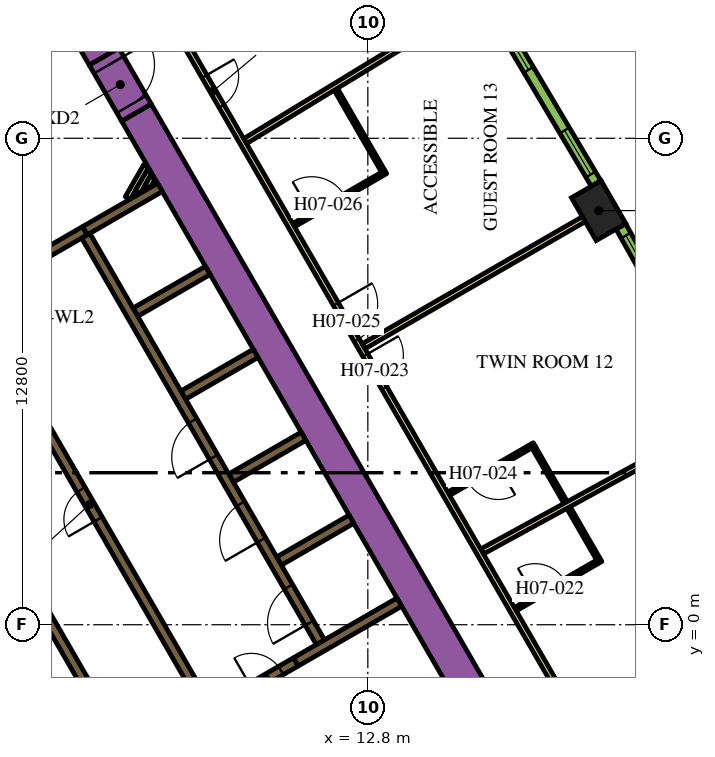
"""IFC4 building model, lengths in metres.
Left out: names, types, materials, properties, quantities, classifications, styles, units other than length and angle.
Written with IfcOpenShell. Run it as: python <this file> out.ifc"""

import sys

from ifc_helpers import new_model, si_unit, direction, frame, frame_2d, origin, origin_2d, place, context, subcontext, project, spatial, polyline, rectangle, outline, extrude, element, fill, save


model = new_model("IFC4")
c1 = context("Model", 3, precision=1e-05, world=origin(), true_north=direction((0.0, 1.0)))
c2 = subcontext(c1, "Body", "Model", "MODEL_VIEW")
j1 = project(units=[si_unit("LENGTHUNIT", "METRE"), si_unit("PLANEANGLEUNIT", "RADIAN")], contexts=[c1])
p1 = place(None, origin())
s1 = spatial("IfcSite", under=j1, at=p1, CompositionType="ELEMENT")
p2 = place(p1, origin())
s2 = spatial("IfcBuilding", under=s1, at=p2, CompositionType="ELEMENT")
p3 = place(p2, frame((0.0, 0.0, 103.2)))
s3 = spatial("IfcBuildingStorey", under=s2, at=p3, CompositionType="ELEMENT", Elevation=103.2)
p4 = place(p3, frame((18.874, 10.897, 0.0), z_axis=(0.0, 0.0, 1.0), x_axis=(-0.5, 0.866025403784, 0.0)))
e1 = element("IfcColumn", 1, at=p4, inside=s3, PredefinedType="COLUMN", context=c2, shape_type="SweptSolid", body=[
    extrude(rectangle(XDim=1.3, YDim=0.9, at=origin_2d()), origin(), (0.0, 0.0, 1.0), 3.9),
])
p5 = place(p3, frame((6.711, 13.476, 0.0), z_axis=(0.0, 0.0, 1.0), x_axis=(0.500002723396, -0.866023831425, 0.0)))
e2 = element("IfcWall", 2, at=p5, inside=s3, PredefinedType="SOLIDWALL", context=c2, shape_type="SweptSolid", body=[
    extrude(rectangle(XDim=20.334, YDim=0.9, at=frame_2d((10.167, 0.0))), origin(), (0.0, 0.0, 1.0), 3.9),
])
p6 = place(p3, frame((5.861, 14.949, 0.0), z_axis=(0.0, 0.0, 1.0), x_axis=(-0.50011719232, 0.865957732194, 0.0)))
e3 = element("IfcWall", 3, at=p6, inside=s3, PredefinedType="SOLIDWALL", context=c2, shape_type="SweptSolid", body=[
    extrude(rectangle(XDim=0.964, YDim=0.9, at=frame_2d((0.482, 0.0))), origin(), (0.0, 0.0, 1.0), 3.9),
])
p7 = place(p3, frame((10.464, 1.677, 0.0), z_axis=(0.0, 0.0, 1.0), x_axis=(0.86605622881, 0.499946605688, 0.0)))
e4 = element("IfcWall", 4, at=p7, inside=s3, PredefinedType="SOLIDWALL", context=c2, shape_type="SweptSolid", body=[
    extrude(rectangle(XDim=2.2, YDim=0.25, at=frame_2d((1.1, 0.0))), origin(), (0.0, 0.0, 1.0), 3.9),
])
p8 = place(p3, frame((13.629, 0.594, 0.0), z_axis=(0.0, 0.0, 1.0), x_axis=(-0.86602790099, -0.499995674689, 0.0)))
e5 = element("IfcWall", 5, at=p8, inside=s3, PredefinedType="SOLIDWALL", context=c2, shape_type="SweptSolid", body=[
    extrude(rectangle(XDim=3.146, YDim=0.25, at=frame_2d((1.573, 0.0))), origin(), (0.0, 0.0, 1.0), 3.9),
])
p9 = place(p3, origin())
e6 = element("IfcWall", 6, at=p9, inside=s3, PredefinedType="SOLIDWALL", context=c2, shape_type="SweptSolid", body=[
    extrude(outline(polyline([(0.566, 6.725), (0.566, 6.875), (0.566, 6.875), (0.565, 6.875), (0.361, 6.875), (0.035, 7.439), (0.252, 7.564), (0.377, 7.348), (6.552, -3.348), (6.677, -3.564), (6.46, -3.689), (0.448, 6.725), (0.565, 6.725), (0.566, 6.725), (0.566, 6.725)])), origin(), (0.0, 0.0, 1.0), 3.9),
])
p10 = place(p3, frame((4.358, 9.791, 0.0), z_axis=(0.0, 0.0, 1.0), x_axis=(0.866079547155, 0.499906209203, 0.0)))
e7 = element("IfcWall", 7, at=p10, inside=s3, PredefinedType="SOLIDWALL", context=c2, shape_type="SweptSolid", body=[
    extrude(rectangle(XDim=1.15, YDim=0.25, at=frame_2d((0.575, 0.0))), origin(), (0.0, 0.0, 1.0), 3.9),
])
p11 = place(p3, frame((5.356, 10.367, 0.0), z_axis=(0.0, 0.0, 1.0), x_axis=(0.865978535641, 0.50008116922, 0.0)))
e8 = element("IfcWall", 8, at=p11, inside=s3, PredefinedType="SOLIDWALL", context=c2, shape_type="SweptSolid", body=[
    extrude(rectangle(XDim=2.278, YDim=0.25, at=frame_2d((1.139, 0.0))), origin(), (0.0, 0.0, 1.0), 3.9),
])
for number, where, z_axis, x_axis in (
    (9, (6.684, 8.224, 0.0), (0.0, 0.0, 1.0), (0.866, 0.5, 0.0)),
    (10, (7.944, 6.041, 0.0), (0.0, 0.0, 1.0), (0.866, 0.5, 0.0)),
    (11, (9.204, 3.859, 0.0), (0.0, 0.0, 1.0), (0.866, 0.5, 0.0)),
):
    element("IfcWall", number, at=place(p3, frame(where, z_axis=z_axis, x_axis=x_axis)), inside=s3, PredefinedType="SOLIDWALL", context=c2, shape_type="SweptSolid", body=[
        extrude(rectangle(XDim=2.2, YDim=0.25, at=frame_2d((1.1, 0.0))), origin(), (0.0, 0.0, 1.0), 3.9),
    ])
p12 = place(p3, frame((6.482, 11.225, 0.0), z_axis=(0.0, 0.0, 1.0), x_axis=(0.5001061818, 0.865964091014, 0.0)))
e12 = element("IfcWall", 12, at=p12, inside=s3, PredefinedType="PARTITIONING", context=c2, shape_type="SweptSolid", body=[
    extrude(rectangle(XDim=0.973, YDim=0.15, at=frame_2d((0.486, 0.0))), origin(), (0.0, 0.0, 1.0), 2.75),
])
p13 = place(p3, frame((6.742, 11.375, 0.0), z_axis=(0.0, 0.0, 1.0), x_axis=(0.499744951064, 0.86617260629, 0.0)))
e13 = element("IfcWall", 13, at=p13, inside=s3, PredefinedType="PARTITIONING", context=c2, shape_type="SweptSolid", body=[
    extrude(rectangle(XDim=0.626, YDim=0.15, at=frame_2d((0.313, 0.0))), origin(), (0.0, 0.0, 1.0), 2.75),
])
p14 = place(p3, frame((7.001, 11.525, 0.0), z_axis=(0.0, 0.0, 1.0), x_axis=(0.499797962495, 0.866142018774, 0.0)))
e14 = element("IfcWall", 14, at=p14, inside=s3, PredefinedType="PARTITIONING", context=c2, shape_type="SweptSolid", body=[
    extrude(rectangle(XDim=0.28, YDim=0.15, at=frame_2d((0.14, 0.0))), origin(), (0.0, 0.0, 1.0), 2.75),
])
p15 = place(p3, frame((11.553, -0.46, 0.0), z_axis=(0.0, 0.0, 1.0), x_axis=(-0.500006514828, 0.866021642414, 0.0)))
e15 = element("IfcWall", 15, at=p15, inside=s3, PredefinedType="SOLIDWALL", context=c2, shape_type="SweptSolid", body=[
    extrude(rectangle(XDim=12.35, YDim=0.25, at=frame_2d((6.175, 0.0))), origin(), (0.0, 0.0, 1.0), 3.9),
])
p16 = place(p15, frame((0.585, 0.0, 0.0)))
e16 = element("IfcOpeningElement", 16, at=p16, cuts=e15, PredefinedType="OPENING", context=c2, shape_type="SweptSolid", body=[
    extrude(rectangle(XDim=1.1, YDim=2.1, at=frame_2d((0.55, 1.05))), frame((0.0, 0.135, 0.0), z_axis=(0.0, -1.0, 0.0), x_axis=(1.0, 0.0, 0.0)), (0.0, 0.0, 1.0), 0.27),
])
p17 = place(p15, frame((3.105, 0.0, 0.0)))
e17 = element("IfcOpeningElement", 17, at=p17, cuts=e15, PredefinedType="OPENING", context=c2, shape_type="SweptSolid", body=[
    extrude(rectangle(XDim=1.1, YDim=2.1, at=frame_2d((0.55, 1.05))), frame((0.0, 0.135, 0.0), z_axis=(0.0, -1.0, 0.0), x_axis=(1.0, 0.0, 0.0)), (0.0, 0.0, 1.0), 0.27),
])
p18 = place(p15, frame((5.625, 0.0, 0.0)))
e18 = element("IfcOpeningElement", 18, at=p18, cuts=e15, PredefinedType="OPENING", context=c2, shape_type="SweptSolid", body=[
    extrude(rectangle(XDim=1.1, YDim=2.1, at=frame_2d((0.55, 1.05))), frame((0.0, 0.135, 0.0), z_axis=(0.0, -1.0, 0.0), x_axis=(1.0, 0.0, 0.0)), (0.0, 0.0, 1.0), 0.27),
])
p19 = place(p3, frame((8.565, -2.185, 0.0), z_axis=(0.0, 0.0, 1.0), x_axis=(-0.499997954832, 0.866026584559, 0.0)))
e19 = element("IfcWall", 19, at=p19, inside=s3, PredefinedType="SOLIDWALL", context=c2, shape_type="SweptSolid", body=[
    extrude(rectangle(XDim=12.35, YDim=0.25, at=frame_2d((6.175, 0.0))), origin(), (0.0, 0.0, 1.0), 3.9),
])
p20 = place(p19, frame((5.725, 0.0, 0.0)))
e20 = element("IfcOpeningElement", 20, at=p20, cuts=e19, PredefinedType="OPENING", context=c2, shape_type="SweptSolid", body=[
    extrude(rectangle(XDim=0.9, YDim=2.1, at=frame_2d((0.45, 1.05))), frame((0.0, 0.135, 0.0), z_axis=(0.0, -1.0, 0.0), x_axis=(1.0, 0.0, 0.0)), (0.0, 0.0, 1.0), 0.27),
])
p21 = place(p3, frame((9.346, -1.879, 0.0), z_axis=(0.0, 0.0, 1.0), x_axis=(0.866047807691, 0.499961193289, 0.0)))
e21 = element("IfcWall", 21, at=p21, inside=s3, PredefinedType="SOLIDWALL", context=c2, shape_type="SweptSolid", body=[
    extrude(rectangle(XDim=1.8, YDim=0.25, at=frame_2d((0.9, 0.0))), origin(), (0.0, 0.0, 1.0), 3.9),
])
p22 = place(p21, frame((0.45, 0.0, 0.0)))
e22 = element("IfcOpeningElement", 22, at=p22, cuts=e21, PredefinedType="OPENING", context=c2, shape_type="SweptSolid", body=[
    extrude(rectangle(XDim=0.9, YDim=2.1, at=frame_2d((0.45, 1.05))), frame((0.0, 0.135, 0.0), z_axis=(0.0, -1.0, 0.0), x_axis=(1.0, 0.0, 0.0)), (0.0, 0.0, 1.0), 0.27),
])
p23 = place(p3, frame((5.861, 14.948, 0.0), z_axis=(0.0, 0.0, 1.0), x_axis=(0.500062241894, -0.865989465428, 0.0)))
e23 = element("IfcWall", 23, at=p23, inside=s3, PredefinedType="SOLIDWALL", context=c2, shape_type="SweptSolid", body=[
    extrude(rectangle(XDim=1.7, YDim=0.9, at=frame_2d((0.85, 0.0))), origin(), (0.0, 0.0, 1.0), 3.9),
])
p24 = place(p23, frame((0.25, 0.0, 0.0)))
e24 = element("IfcOpeningElement", 24, at=p24, cuts=e23, PredefinedType="OPENING", context=c2, shape_type="SweptSolid", body=[
    extrude(rectangle(XDim=1.2, YDim=2.1, at=frame_2d((0.6, 1.05))), frame((0.0, 0.46, 0.0), z_axis=(0.0, -1.0, 0.0), x_axis=(1.0, 0.0, 0.0)), (0.0, 0.0, 1.0), 0.92),
])
p25 = place(p3, frame((6.163, 18.475, 0.0), z_axis=(0.0, 0.0, 1.0), x_axis=(0.500001317485, -0.866024643133, 0.0)))
e25 = element("IfcWall", 25, at=p25, inside=s3, PredefinedType="PARTITIONING", context=c2, shape_type="SweptSolid", body=[
    extrude(rectangle(XDim=25.767, YDim=0.15, at=frame_2d((12.883, 0.0))), origin(), (0.0, 0.0, 1.0), 2.75),
])
p26 = place(p25, frame((24.241, 0.0, 0.0)))
e26 = element("IfcOpeningElement", 26, at=p26, cuts=e25, PredefinedType="OPENING", context=c2, shape_type="SweptSolid", body=[
    extrude(rectangle(XDim=1.0, YDim=2.1, at=frame_2d((0.5, 1.05))), frame((0.0, 0.085, 0.0), z_axis=(0.0, -1.0, 0.0), x_axis=(1.0, 0.0, 0.0)), (0.0, 0.0, 1.0), 0.17),
])
p27 = place(p25, frame((13.144, 0.0, 0.0)))
e27 = element("IfcOpeningElement", 27, at=p27, cuts=e25, PredefinedType="OPENING", context=c2, shape_type="SweptSolid", body=[
    extrude(rectangle(XDim=1.0, YDim=2.1, at=frame_2d((0.5, 1.05))), frame((0.0, 0.085, 0.0), z_axis=(0.0, -1.0, 0.0), x_axis=(1.0, 0.0, 0.0)), (0.0, 0.0, 1.0), 0.17),
])
p28 = place(p25, frame((11.592, 0.0, 0.0)))
e28 = element("IfcOpeningElement", 28, at=p28, cuts=e25, PredefinedType="OPENING", context=c2, shape_type="SweptSolid", body=[
    extrude(rectangle(XDim=1.1, YDim=2.1, at=frame_2d((0.55, 1.05))), frame((0.0, 0.085, 0.0), z_axis=(0.0, -1.0, 0.0), x_axis=(1.0, 0.0, 0.0)), (0.0, 0.0, 1.0), 0.17),
])
p29 = place(p25, frame((4.674, 0.0, 0.0)))
e29 = element("IfcOpeningElement", 29, at=p29, cuts=e25, PredefinedType="OPENING", context=c2, shape_type="SweptSolid", body=[
    extrude(rectangle(XDim=0.9, YDim=2.1, at=frame_2d((0.45, 1.05))), frame((0.0, 0.085, 0.0), z_axis=(0.0, -1.0, 0.0), x_axis=(1.0, 0.0, 0.0)), (0.0, 0.0, 1.0), 0.17),
])
p30 = place(p25, frame((2.411, 0.0, 0.0)))
e30 = element("IfcOpeningElement", 30, at=p30, cuts=e25, PredefinedType="OPENING", context=c2, shape_type="SweptSolid", body=[
    extrude(rectangle(XDim=1.0, YDim=2.1, at=frame_2d((0.5, 1.05))), frame((0.0, 0.085, 0.0), z_axis=(0.0, -1.0, 0.0), x_axis=(1.0, 0.0, 0.0)), (0.0, 0.0, 1.0), 0.17),
])
p31 = place(p3, frame((15.225, 16.167, 0.0), z_axis=(0.0, 0.0, 1.0), x_axis=(-0.854088713274, -0.520127359266, 0.0)))
e31 = element("IfcWall", 31, at=p31, inside=s3, PredefinedType="PARTITIONING", context=c2, shape_type="SweptSolid", body=[
    extrude(rectangle(XDim=6.611, YDim=0.15, at=frame_2d((3.305, 0.0))), origin(), (0.0, 0.0, 1.0), 2.75),
])
p32 = place(p3, frame((18.484, 10.672, 0.0), z_axis=(0.0, 0.0, 1.0), x_axis=(-0.866019162053, -0.50001081084, 0.0)))
e32 = element("IfcWall", 32, at=p32, inside=s3, PredefinedType="PARTITIONING", context=c2, shape_type="SweptSolid", body=[
    extrude(rectangle(XDim=6.694, YDim=0.15, at=frame_2d((3.347, 0.0))), origin(), (0.0, 0.0, 1.0), 2.75),
])
p33 = place(p3, frame((21.614, 5.102, 0.0), z_axis=(0.0, 0.0, 1.0), x_axis=(-0.877484555087, -0.479604895287, 0.0)))
e33 = element("IfcWall", 33, at=p33, inside=s3, PredefinedType="PARTITIONING", context=c2, shape_type="SweptSolid", body=[
    extrude(rectangle(XDim=6.611, YDim=0.15, at=frame_2d((3.306, 0.0))), origin(), (0.0, 0.0, 1.0), 2.75),
])
p34 = place(p3, frame((24.613, -0.541, 0.0), z_axis=(0.0, 0.0, 1.0), x_axis=(-0.888459912519, -0.458954228487, 0.0)))
e34 = element("IfcWall", 34, at=p34, inside=s3, PredefinedType="PARTITIONING", context=c2, shape_type="SweptSolid", body=[
    extrude(rectangle(XDim=6.392, YDim=0.15, at=frame_2d((3.196, 0.0))), origin(), (0.0, 0.0, 1.0), 2.75),
])
p35 = place(p3, frame((16.681, 0.407, 0.0), z_axis=(0.0, 0.0, 1.0), x_axis=(0.866021400173, 0.500006934395, 0.0)))
e35 = element("IfcWall", 35, at=p35, inside=s3, PredefinedType="PARTITIONING", context=c2, shape_type="SweptSolid", body=[
    extrude(rectangle(XDim=2.6, YDim=0.1, at=frame_2d((1.3, 0.0))), origin(), (0.0, 0.0, 1.0), 2.75),
])
p36 = place(p35, frame((0.6, 0.0, 0.0)))
e36 = element("IfcOpeningElement", 36, at=p36, cuts=e35, PredefinedType="OPENING", context=c2, shape_type="SweptSolid", body=[
    extrude(rectangle(XDim=0.9, YDim=2.1, at=frame_2d((0.45, 1.05))), frame((0.0, 0.06, 0.0), z_axis=(0.0, -1.0, 0.0), x_axis=(1.0, 0.0, 0.0)), (0.0, 0.0, 1.0), 0.12),
])
p37 = place(p3, frame((18.86, 1.734, 0.0), z_axis=(0.0, 0.0, 1.0), x_axis=(-0.500017819788, 0.86601511528, 0.0)))
e37 = element("IfcWall", 37, at=p37, inside=s3, PredefinedType="PARTITIONING", context=c2, shape_type="SweptSolid", body=[
    extrude(rectangle(XDim=1.55, YDim=0.1, at=frame_2d((0.775, 0.0))), origin(), (0.0, 0.0, 1.0), 2.75),
])
p38 = place(p3, frame((17.179, 4.745, 0.0), z_axis=(0.0, 0.0, 1.0), x_axis=(-0.866021400173, -0.500006934395, 0.0)))
e38 = element("IfcWall", 38, at=p38, inside=s3, PredefinedType="PARTITIONING", context=c2, shape_type="SweptSolid", body=[
    extrude(rectangle(XDim=2.6, YDim=0.1, at=frame_2d((1.3, 0.0))), origin(), (0.0, 0.0, 1.0), 2.75),
])
p39 = place(p38, frame((1.1, 0.0, 0.0)))
e39 = element("IfcOpeningElement", 39, at=p39, cuts=e38, PredefinedType="OPENING", context=c2, shape_type="SweptSolid", body=[
    extrude(rectangle(XDim=0.9, YDim=2.1, at=frame_2d((0.45, 1.05))), frame((0.0, 0.06, 0.0), z_axis=(0.0, -1.0, 0.0), x_axis=(1.0, 0.0, 0.0)), (0.0, 0.0, 1.0), 0.12),
])
p40 = place(p3, frame((17.161, 4.677, 0.0), z_axis=(0.0, 0.0, 1.0), x_axis=(0.499890179513, -0.866088799389, 0.0)))
e40 = element("IfcWall", 40, at=p40, inside=s3, PredefinedType="PARTITIONING", context=c2, shape_type="SweptSolid", body=[
    extrude(rectangle(XDim=1.68, YDim=0.1, at=frame_2d((0.84, 0.0))), origin(), (0.0, 0.0, 1.0), 2.75),
])
p41 = place(p3, frame((10.847, 10.513, 0.0), z_axis=(0.0, 0.0, 1.0), x_axis=(0.865996816683, 0.500049511043, 0.0)))
e41 = element("IfcWall", 41, at=p41, inside=s3, PredefinedType="PARTITIONING", context=c2, shape_type="SweptSolid", body=[
    extrude(rectangle(XDim=2.8, YDim=0.1, at=frame_2d((1.4, 0.0))), origin(), (0.0, 0.0, 1.0), 2.75),
])
p42 = place(p41, frame((0.55, 0.0, 0.0)))
e42 = element("IfcOpeningElement", 42, at=p42, cuts=e41, PredefinedType="OPENING", context=c2, shape_type="SweptSolid", body=[
    extrude(rectangle(XDim=1.0, YDim=2.1, at=frame_2d((0.5, 1.05))), frame((0.0, 0.06, 0.0), z_axis=(0.0, -1.0, 0.0), x_axis=(1.0, 0.0, 0.0)), (0.0, 0.0, 1.0), 0.12),
])
p43 = place(p3, frame((13.203, 11.931, 0.0), z_axis=(0.0, 0.0, 1.0), x_axis=(-0.499988411372, 0.866032094379, 0.0)))
e43 = element("IfcWall", 43, at=p43, inside=s3, PredefinedType="PARTITIONING", context=c2, shape_type="SweptSolid", body=[
    extrude(rectangle(XDim=2.49, YDim=0.1, at=frame_2d((1.245, 0.0))), origin(), (0.0, 0.0, 1.0), 2.75),
])
p44 = place(p3, frame((21.956, 6.033, 0.0), z_axis=(0.0, 0.0, 1.0), x_axis=(-0.48983164787, 0.87181704316, 0.0)))
e44 = element("IfcWall", 44, at=p44, inside=s3, PredefinedType="SOLIDWALL", context=c2, shape_type="SweptSolid", body=[
    extrude(rectangle(XDim=5.1, YDim=0.29, at=frame_2d((2.55, 0.0))), origin(), (0.0, 0.0, 1.0), 3.65),
])
p45 = place(p44, frame((0.273, 0.0, 0.9)))
e45 = element("IfcOpeningElement", 45, at=p45, cuts=e44, PredefinedType="OPENING", context=c2, shape_type="SweptSolid", body=[
    extrude(rectangle(XDim=1.35, YDim=2.15, at=frame_2d((0.675, 1.075))), frame((0.0, 0.155, 0.0), z_axis=(0.0, -1.0, 0.0), x_axis=(1.0, 0.0, 0.0)), (0.0, 0.0, 1.0), 0.31),
])
p46 = place(p44, frame((3.478, 0.0, 0.9)))
e46 = element("IfcOpeningElement", 46, at=p46, cuts=e44, PredefinedType="OPENING", context=c2, shape_type="SweptSolid", body=[
    extrude(rectangle(XDim=1.35, YDim=2.15, at=frame_2d((0.675, 1.075))), frame((0.0, 0.155, 0.0), z_axis=(0.0, -1.0, 0.0), x_axis=(1.0, 0.0, 0.0)), (0.0, 0.0, 1.0), 0.31),
])
p47 = place(p3, frame((18.805, 11.611, 0.0), z_axis=(0.0, 0.0, 1.0), x_axis=(-0.510054281659, 0.860142214847, 0.0)))
e47 = element("IfcWall", 47, at=p47, inside=s3, PredefinedType="SOLIDWALL", context=c2, shape_type="SweptSolid", body=[
    extrude(rectangle(XDim=5.101, YDim=0.29, at=frame_2d((2.55, 0.0))), origin(), (0.0, 0.0, 1.0), 3.65),
])
p48 = place(p47, frame((0.273, 0.0, 0.9)))
e48 = element("IfcOpeningElement", 48, at=p48, cuts=e47, PredefinedType="OPENING", context=c2, shape_type="SweptSolid", body=[
    extrude(rectangle(XDim=1.35, YDim=2.15, at=frame_2d((0.675, 1.075))), frame((0.0, 0.155, 0.0), z_axis=(0.0, -1.0, 0.0), x_axis=(1.0, 0.0, 0.0)), (0.0, 0.0, 1.0), 0.31),
])
p49 = place(p47, frame((3.478, 0.0, 0.9)))
e49 = element("IfcOpeningElement", 49, at=p49, cuts=e47, PredefinedType="OPENING", context=c2, shape_type="SweptSolid", body=[
    extrude(rectangle(XDim=1.35, YDim=2.15, at=frame_2d((0.675, 1.075))), frame((0.0, 0.155, 0.0), z_axis=(0.0, -1.0, 0.0), x_axis=(1.0, 0.0, 0.0)), (0.0, 0.0, 1.0), 0.31),
])
p50 = place(p16, origin())
e50 = element("IfcDoor", 50, at=p50, inside=s3, OperationType="DOUBLE_DOOR_SLIDING", PredefinedType="DOOR", context=c2, shape_type="SweptSolid", body=[
    extrude(rectangle(XDim=1.1, YDim=2.1, at=frame_2d((0.55, 1.05))), frame((0.0, 0.025, 0.0), z_axis=(0.0, -1.0, 0.0), x_axis=(1.0, 0.0, 0.0)), (0.0, 0.0, 1.0), 0.05),
])
fill(e16, e50)
p51 = place(p17, origin())
e51 = element("IfcDoor", 51, at=p51, inside=s3, OperationType="DOUBLE_DOOR_SLIDING", PredefinedType="DOOR", context=c2, shape_type="SweptSolid", body=[
    extrude(rectangle(XDim=1.1, YDim=2.1, at=frame_2d((0.55, 1.05))), frame((0.0, 0.025, 0.0), z_axis=(0.0, -1.0, 0.0), x_axis=(1.0, 0.0, 0.0)), (0.0, 0.0, 1.0), 0.05),
])
fill(e17, e51)
p52 = place(p18, origin())
e52 = element("IfcDoor", 52, at=p52, inside=s3, OperationType="DOUBLE_DOOR_SLIDING", PredefinedType="DOOR", context=c2, shape_type="SweptSolid", body=[
    extrude(rectangle(XDim=1.1, YDim=2.1, at=frame_2d((0.55, 1.05))), frame((0.0, 0.025, 0.0), z_axis=(0.0, -1.0, 0.0), x_axis=(1.0, 0.0, 0.0)), (0.0, 0.0, 1.0), 0.05),
])
fill(e18, e52)
p53 = place(p20, origin())
e53 = element("IfcDoor", 53, at=p53, inside=s3, OperationType="SINGLE_SWING_LEFT", PredefinedType="DOOR", context=c2, shape_type="SweptSolid", body=[
    extrude(rectangle(XDim=0.9, YDim=2.1, at=frame_2d((0.45, 1.05))), frame((0.0, 0.025, 0.0), z_axis=(0.0, -1.0, 0.0), x_axis=(1.0, 0.0, 0.0)), (0.0, 0.0, 1.0), 0.05),
])
fill(e20, e53)
p54 = place(p22, origin())
e54 = element("IfcDoor", 54, at=p54, inside=s3, OperationType="SINGLE_SWING_LEFT", PredefinedType="DOOR", context=c2, shape_type="SweptSolid", body=[
    extrude(rectangle(XDim=0.9, YDim=2.1, at=frame_2d((0.45, 1.05))), frame((0.0, 0.025, 0.0), z_axis=(0.0, -1.0, 0.0), x_axis=(1.0, 0.0, 0.0)), (0.0, 0.0, 1.0), 0.05),
])
fill(e22, e54)
p55 = place(p24, origin())
e55 = element("IfcDoor", 55, at=p55, inside=s3, OperationType="SINGLE_SWING_LEFT", PredefinedType="DOOR", context=c2, shape_type="SweptSolid", body=[
    extrude(rectangle(XDim=1.2, YDim=2.1, at=frame_2d((0.6, 1.05))), frame((0.0, 0.025, 0.0), z_axis=(0.0, -1.0, 0.0), x_axis=(1.0, 0.0, 0.0)), (0.0, 0.0, 1.0), 0.05),
])
fill(e24, e55)
p56 = place(p36, origin())
e56 = element("IfcDoor", 56, at=p56, inside=s3, OperationType="SINGLE_SWING_LEFT", PredefinedType="DOOR", context=c2, shape_type="SweptSolid", body=[
    extrude(rectangle(XDim=0.9, YDim=2.1, at=frame_2d((0.45, 1.05))), frame((0.0, 0.025, 0.0), z_axis=(0.0, -1.0, 0.0), x_axis=(1.0, 0.0, 0.0)), (0.0, 0.0, 1.0), 0.05),
])
fill(e36, e56)
p57 = place(p27, origin())
e57 = element("IfcDoor", 57, at=p57, inside=s3, OperationType="SINGLE_SWING_LEFT", PredefinedType="DOOR", context=c2, shape_type="SweptSolid", body=[
    extrude(rectangle(XDim=1.0, YDim=2.1, at=frame_2d((0.5, 1.05))), frame((0.0, 0.025, 0.0), z_axis=(0.0, -1.0, 0.0), x_axis=(1.0, 0.0, 0.0)), (0.0, 0.0, 1.0), 0.05),
])
fill(e27, e57)
p58 = place(p39, origin())
e58 = element("IfcDoor", 58, at=p58, inside=s3, OperationType="SINGLE_SWING_RIGHT", PredefinedType="DOOR", context=c2, shape_type="SweptSolid", body=[
    extrude(rectangle(XDim=0.9, YDim=2.1, at=frame_2d((0.45, 1.05))), frame((0.0, 0.025, 0.0), z_axis=(0.0, -1.0, 0.0), x_axis=(1.0, 0.0, 0.0)), (0.0, 0.0, 1.0), 0.05),
])
fill(e39, e58)
p59 = place(p28, origin())
e59 = element("IfcDoor", 59, at=p59, inside=s3, OperationType="SINGLE_SWING_RIGHT", PredefinedType="DOOR", context=c2, shape_type="SweptSolid", body=[
    extrude(rectangle(XDim=1.1, YDim=2.1, at=frame_2d((0.55, 1.05))), frame((0.0, 0.025, 0.0), z_axis=(0.0, -1.0, 0.0), x_axis=(1.0, 0.0, 0.0)), (0.0, 0.0, 1.0), 0.05),
])
fill(e28, e59)
p60 = place(p42, origin())
e60 = element("IfcDoor", 60, at=p60, inside=s3, OperationType="SINGLE_SWING_LEFT", PredefinedType="DOOR", context=c2, shape_type="SweptSolid", body=[
    extrude(rectangle(XDim=1.0, YDim=2.1, at=frame_2d((0.5, 1.05))), frame((0.0, 0.025, 0.0), z_axis=(0.0, -1.0, 0.0), x_axis=(1.0, 0.0, 0.0)), (0.0, 0.0, 1.0), 0.05),
])
fill(e42, e60)
p61 = place(p29, origin())
e61 = element("IfcDoor", 61, at=p61, inside=s3, OperationType="SINGLE_SWING_RIGHT", PredefinedType="DOOR", context=c2, shape_type="SweptSolid", body=[
    extrude(rectangle(XDim=0.9, YDim=2.1, at=frame_2d((0.45, 1.05))), frame((0.0, 0.025, 0.0), z_axis=(0.0, -1.0, 0.0), x_axis=(1.0, 0.0, 0.0)), (0.0, 0.0, 1.0), 0.05),
])
fill(e29, e61)
p62 = place(p46, origin())
e62 = element("IfcWindow", 62, at=p62, inside=s3, PartitioningType="DOUBLE_PANEL_VERTICAL", PredefinedType="WINDOW", context=c2, shape_type="SweptSolid", body=[
    extrude(rectangle(XDim=1.35, YDim=2.15, at=frame_2d((0.675, 1.075))), frame((0.0, 0.015, 0.0), z_axis=(0.0, -1.0, 0.0), x_axis=(1.0, 0.0, 0.0)), (0.0, 0.0, 1.0), 0.06),
])
fill(e46, e62)
p63 = place(p48, origin())
e63 = element("IfcWindow", 63, at=p63, inside=s3, PartitioningType="DOUBLE_PANEL_VERTICAL", PredefinedType="WINDOW", context=c2, shape_type="SweptSolid", body=[
    extrude(rectangle(XDim=1.35, YDim=2.15, at=frame_2d((0.675, 1.075))), frame((0.0, 0.015, 0.0), z_axis=(0.0, -1.0, 0.0), x_axis=(1.0, 0.0, 0.0)), (0.0, 0.0, 1.0), 0.06),
])
fill(e48, e63)
p64 = place(p49, origin())
e64 = element("IfcWindow", 64, at=p64, inside=s3, PartitioningType="DOUBLE_PANEL_VERTICAL", PredefinedType="WINDOW", context=c2, shape_type="SweptSolid", body=[
    extrude(rectangle(XDim=1.35, YDim=2.15, at=frame_2d((0.675, 1.075))), frame((0.0, 0.015, 0.0), z_axis=(0.0, -1.0, 0.0), x_axis=(1.0, 0.0, 0.0)), (0.0, 0.0, 1.0), 0.06),
])
fill(e49, e64)
save(model, sys.argv[1])
